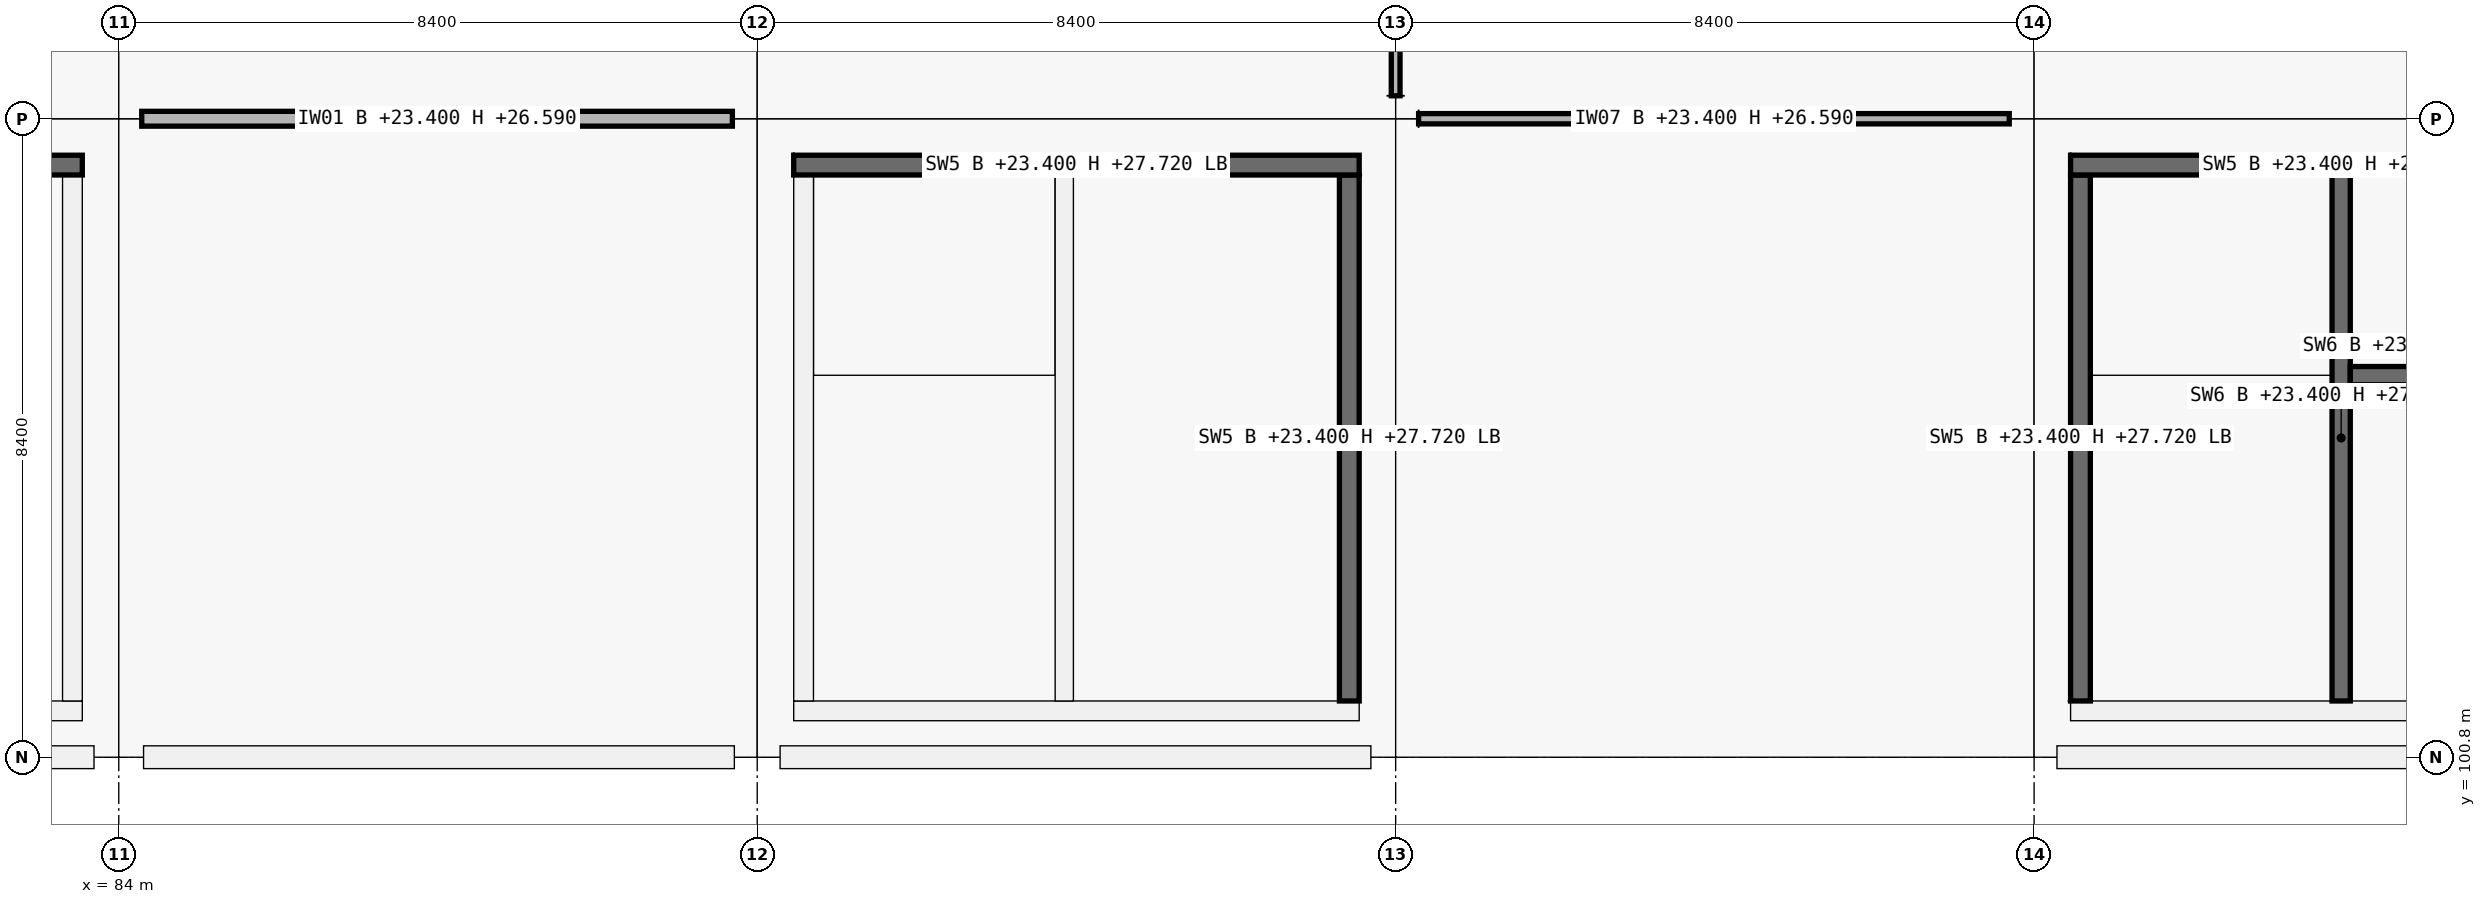
"""IFC4 building model, lengths in metres.
Left out: names, types, materials, properties, quantities, classifications, styles, units other than length and angle.
Written with IfcOpenShell. Run it as: python <this file> out.ifc"""

import sys

from ifc_helpers import new_model, si_unit, direction, frame, frame_2d, origin, origin_2d, place, context, subcontext, project, spatial, rectangle, extrude, element, fill, save


model = new_model("IFC4")
c1 = context("Model", 3, precision=1e-05, world=origin(), true_north=direction((0.0, 1.0)))
c2 = subcontext(c1, "Body", "Model", "MODEL_VIEW")
j1 = project(units=[si_unit("LENGTHUNIT", "METRE"), si_unit("PLANEANGLEUNIT", "RADIAN")], contexts=[c1])
p1 = place(None, origin())
s1 = spatial("IfcSite", under=j1, at=p1, CompositionType="ELEMENT")
p2 = place(p1, origin())
s2 = spatial("IfcBuilding", under=s1, at=p2, CompositionType="ELEMENT")
p3 = place(p2, frame((0.0, 0.0, 23.4)))
s3 = spatial("IfcBuildingStorey", under=s2, at=p3, CompositionType="ELEMENT", Elevation=23.4)
p4 = place(p3, frame((84.0, 100.8, 0.0), z_axis=(0.0, 0.0, 1.0), x_axis=(1.0, 0.0, 0.0)))
e1 = element("IfcColumn", 1, at=p4, inside=s3, PredefinedType="COLUMN", context=c2, shape_type="SweptSolid", body=[
    extrude(rectangle(XDim=0.65, YDim=0.65, at=origin_2d()), origin(), (0.0, 0.0, 1.0), 4.32),
])
for number, where, z_axis, x_axis in (
    (2, (84.0, 109.2, 0.0), (0.0, 0.0, 1.0), (1.0, 0.0, 0.0)),
    (3, (92.4, 100.8, 0.0), (0.0, 0.0, 1.0), (1.0, 0.0, 0.0)),
):
    element("IfcColumn", number, at=place(p3, frame(where, z_axis=z_axis, x_axis=x_axis)), inside=s3, PredefinedType="COLUMN", context=c2, shape_type="SweptSolid", body=[
        extrude(rectangle(XDim=0.6, YDim=0.6, at=origin_2d()), origin(), (0.0, 0.0, 1.0), 4.32),
    ])
for number, where, z_axis, x_axis in (
    (4, (92.4, 109.2, 0.0), (0.0, 0.0, 1.0), (1.0, 0.0, 0.0)),
    (5, (100.8, 100.8, 0.0), (0.0, 0.0, 1.0), (1.0, 0.0, 0.0)),
):
    element("IfcColumn", number, at=place(p3, frame(where, z_axis=z_axis, x_axis=x_axis)), inside=s3, PredefinedType="COLUMN", context=c2, shape_type="SweptSolid", body=[
        extrude(rectangle(XDim=0.65, YDim=0.65, at=origin_2d()), origin(), (0.0, 0.0, 1.0), 4.32),
    ])
for number, where, z_axis, x_axis in (
    (6, (100.8, 109.2, 0.0), (0.0, 0.0, 1.0), (1.0, 0.0, 0.0)),
    (7, (109.2, 100.8, 0.0), (0.0, 0.0, 1.0), (1.0, 0.0, 0.0)),
):
    element("IfcColumn", number, at=place(p3, frame(where, z_axis=z_axis, x_axis=x_axis)), inside=s3, PredefinedType="COLUMN", context=c2, shape_type="SweptSolid", body=[
        extrude(rectangle(XDim=0.6, YDim=0.6, at=origin_2d()), origin(), (0.0, 0.0, 1.0), 4.32),
    ])
p5 = place(p3, frame((109.2, 109.2, 0.0), z_axis=(0.0, 0.0, 1.0), x_axis=(1.0, 0.0, 0.0)))
e8 = element("IfcColumn", 8, at=p5, inside=s3, PredefinedType="COLUMN", context=c2, shape_type="SweptSolid", body=[
    extrude(rectangle(XDim=0.65, YDim=0.65, at=origin_2d()), origin(), (0.0, 0.0, 1.0), 4.32),
])
p6 = place(p3, frame((83.674, 100.8, 0.0), z_axis=(0.0, 0.0, 1.0), x_axis=(-1.0, 0.0, 0.0)))
e9 = element("IfcWall", 9, at=p6, inside=s3, PredefinedType="SOLIDWALL", context=c2, shape_type="SweptSolid", body=[
    extrude(rectangle(XDim=7.773, YDim=0.3, at=frame_2d((3.887, 0.0))), origin(), (0.0, 0.0, 1.0), 3.37),
])
p7 = place(p3, frame((92.099, 100.8, 0.0), z_axis=(0.0, 0.0, 1.0), x_axis=(-1.0, 0.0, 0.0)))
e10 = element("IfcWall", 10, at=p7, inside=s3, PredefinedType="SOLIDWALL", context=c2, shape_type="SweptSolid", body=[
    extrude(rectangle(XDim=7.773, YDim=0.3, at=frame_2d((3.887, 0.0))), origin(), (0.0, 0.0, 1.0), 3.37),
])
p8 = place(p7, frame((2.861, 0.0, 0.9)))
e11 = element("IfcOpeningElement", 11, at=p8, cuts=e10, PredefinedType="OPENING", context=c2, shape_type="SweptSolid", body=[
    extrude(rectangle(XDim=2.05, YDim=1.45, at=frame_2d((1.025, 0.725))), frame((0.0, 0.15, 0.0), z_axis=(0.0, -1.0, 0.0), x_axis=(1.0, 0.0, 0.0)), (0.0, 0.0, 1.0), 0.3),
])
p9 = place(p3, frame((100.474, 100.8, 0.0), z_axis=(0.0, 0.0, 1.0), x_axis=(-1.0, 0.0, 0.0)))
e12 = element("IfcWall", 12, at=p9, inside=s3, PredefinedType="SOLIDWALL", context=c2, shape_type="SweptSolid", body=[
    extrude(rectangle(XDim=7.773, YDim=0.3, at=frame_2d((3.887, 0.0))), origin(), (0.0, 0.0, 1.0), 3.37),
])
p10 = place(p3, frame((117.274, 100.8, 0.0), z_axis=(0.0, 0.0, 1.0), x_axis=(-1.0, 0.0, 0.0)))
e13 = element("IfcWall", 13, at=p10, inside=s3, PredefinedType="SOLIDWALL", context=c2, shape_type="SweptSolid", body=[
    extrude(rectangle(XDim=7.773, YDim=0.3, at=frame_2d((3.886, 0.0))), origin(), (0.0, 0.0, 1.0), 3.37),
])
p11 = place(p3, frame((117.12, 101.41, 0.0), z_axis=(0.0, 0.0, 1.0), x_axis=(-1.0, 0.0, 0.0)))
e14 = element("IfcWall", 14, at=p11, inside=s3, PredefinedType="SHEAR", context=c2, shape_type="SweptSolid", body=[
    extrude(rectangle(XDim=7.44, YDim=0.26, at=frame_2d((3.72, 0.0))), origin(), (0.0, 0.0, 1.0), 4.32),
])
p12 = place(p3, frame((109.81, 101.54, 0.0), z_axis=(0.0, 0.0, 1.0), x_axis=(0.0, 1.0, 0.0)))
e15 = element("IfcWall", 15, at=p12, inside=s3, PredefinedType="SHEAR", context=c2, shape_type="SweptSolid", body=[
    extrude(rectangle(XDim=6.92, YDim=0.26, at=frame_2d((3.46, 0.0))), origin(), (0.0, 0.0, 1.0), 4.32),
])
p13 = place(p3, frame((109.68, 108.59, 0.0), z_axis=(0.0, 0.0, 1.0), x_axis=(1.0, 0.0, 0.0)))
e16 = element("IfcWall", 16, at=p13, inside=s3, PredefinedType="SHEAR", context=c2, shape_type="SweptSolid", body=[
    extrude(rectangle(XDim=7.44, YDim=0.26, at=frame_2d((3.72, 0.0))), origin(), (0.0, 0.0, 1.0), 4.32),
])
p14 = place(p3, frame((113.24, 101.54, 0.0), z_axis=(0.0, 0.0, 1.0), x_axis=(0.0, 1.0, 0.0)))
e17 = element("IfcWall", 17, at=p14, inside=s3, PredefinedType="SHEAR", context=c2, shape_type="SweptSolid", body=[
    extrude(rectangle(XDim=6.92, YDim=0.24, at=frame_2d((3.46, 0.0))), origin(), (0.0, 0.0, 1.0), 4.32),
])
p15 = place(p14, frame((0.12, 0.0, 0.0)))
e18 = element("IfcOpeningElement", 18, at=p15, cuts=e17, PredefinedType="OPENING", context=c2, shape_type="SweptSolid", body=[
    extrude(rectangle(XDim=1.0, YDim=2.15, at=frame_2d((0.5, 1.075))), frame((0.0, 0.12, 0.0), z_axis=(0.0, -1.0, 0.0), x_axis=(1.0, 0.0, 0.0)), (0.0, 0.0, 1.0), 0.24),
])
p16 = place(p3, frame((113.36, 105.82, 0.0), z_axis=(0.0, 0.0, 1.0), x_axis=(1.0, 0.0, 0.0)))
e19 = element("IfcWall", 19, at=p16, inside=s3, PredefinedType="SHEAR", context=c2, shape_type="SweptSolid", body=[
    extrude(rectangle(XDim=3.5, YDim=0.24, at=frame_2d((1.75, 0.0))), origin(), (0.0, 0.0, 1.0), 4.32),
])
p17 = place(p16, frame((1.15, 0.0, 0.0)))
e20 = element("IfcOpeningElement", 20, at=p17, cuts=e19, PredefinedType="OPENING", context=c2, shape_type="SweptSolid", body=[
    extrude(rectangle(XDim=1.2, YDim=2.2, at=frame_2d((0.6, 1.1))), frame((0.0, 0.12, 0.0), z_axis=(0.0, -1.0, 0.0), x_axis=(1.0, 0.0, 0.0)), (0.0, 0.0, 1.0), 0.24),
])
for number, where, z_axis, x_axis in (
    (21, (83.52, 101.41, 0.0), (0.0, 0.0, 1.0), (-1.0, 0.0, 0.0)),
    (22, (76.08, 108.59, 0.0), (0.0, 0.0, 1.0), (1.0, 0.0, 0.0)),
):
    element("IfcWall", number, at=place(p3, frame(where, z_axis=z_axis, x_axis=x_axis)), inside=s3, PredefinedType="SHEAR", context=c2, shape_type="SweptSolid", body=[
        extrude(rectangle(XDim=7.44, YDim=0.26, at=frame_2d((3.72, 0.0))), origin(), (0.0, 0.0, 1.0), 4.32),
    ])
p18 = place(p3, frame((83.39, 108.46, 0.0), z_axis=(0.0, 0.0, 1.0), x_axis=(0.0, -1.0, 0.0)))
e23 = element("IfcWall", 23, at=p18, inside=s3, PredefinedType="SHEAR", context=c2, shape_type="SweptSolid", body=[
    extrude(rectangle(XDim=6.92, YDim=0.26, at=frame_2d((3.46, 0.0))), origin(), (0.0, 0.0, 1.0), 4.32),
])
p19 = place(p18, frame((4.01, 0.0, 0.0)))
e24 = element("IfcOpeningElement", 24, at=p19, cuts=e23, PredefinedType="OPENING", context=c2, shape_type="SweptSolid", body=[
    extrude(rectangle(XDim=1.5, YDim=2.15, at=frame_2d((0.75, 1.075))), frame((0.0, 0.13, 0.0), z_axis=(0.0, -1.0, 0.0), x_axis=(1.0, 0.0, 0.0)), (0.0, 0.0, 1.0), 0.26),
])
p20 = place(p3, frame((100.32, 101.41, 0.0), z_axis=(0.0, 0.0, 1.0), x_axis=(-1.0, 0.0, 0.0)))
e25 = element("IfcWall", 25, at=p20, inside=s3, PredefinedType="SHEAR", context=c2, shape_type="SweptSolid", body=[
    extrude(rectangle(XDim=7.44, YDim=0.26, at=frame_2d((3.72, 0.0))), origin(), (0.0, 0.0, 1.0), 4.32),
])
p21 = place(p3, frame((93.01, 101.54, 0.0), z_axis=(0.0, 0.0, 1.0), x_axis=(0.0, 1.0, 0.0)))
e26 = element("IfcWall", 26, at=p21, inside=s3, PredefinedType="SHEAR", context=c2, shape_type="SweptSolid", body=[
    extrude(rectangle(XDim=6.92, YDim=0.26, at=frame_2d((3.46, 0.0))), origin(), (0.0, 0.0, 1.0), 4.32),
])
p22 = place(p3, frame((92.88, 108.59, 0.0), z_axis=(0.0, 0.0, 1.0), x_axis=(1.0, 0.0, 0.0)))
e27 = element("IfcWall", 27, at=p22, inside=s3, PredefinedType="SHEAR", context=c2, shape_type="SweptSolid", body=[
    extrude(rectangle(XDim=7.44, YDim=0.26, at=frame_2d((3.72, 0.0))), origin(), (0.0, 0.0, 1.0), 4.32),
])
p23 = place(p3, frame((100.19, 108.46, 0.0), z_axis=(0.0, 0.0, 1.0), x_axis=(0.0, -1.0, 0.0)))
e28 = element("IfcWall", 28, at=p23, inside=s3, PredefinedType="SHEAR", context=c2, shape_type="SweptSolid", body=[
    extrude(rectangle(XDim=6.92, YDim=0.26, at=frame_2d((3.46, 0.0))), origin(), (0.0, 0.0, 1.0), 4.32),
])
p24 = place(p23, frame((4.01, 0.0, 0.0)))
e29 = element("IfcOpeningElement", 29, at=p24, cuts=e28, PredefinedType="OPENING", context=c2, shape_type="SweptSolid", body=[
    extrude(rectangle(XDim=1.5, YDim=2.15, at=frame_2d((0.75, 1.075))), frame((0.0, 0.13, 0.0), z_axis=(0.0, -1.0, 0.0), x_axis=(1.0, 0.0, 0.0)), (0.0, 0.0, 1.0), 0.26),
])
p25 = place(p3, frame((96.44, 101.54, 0.0), z_axis=(0.0, 0.0, 1.0), x_axis=(0.0, 1.0, 0.0)))
e30 = element("IfcWall", 30, at=p25, inside=s3, PredefinedType="SHEAR", context=c2, shape_type="SweptSolid", body=[
    extrude(rectangle(XDim=6.92, YDim=0.24, at=frame_2d((3.46, 0.0))), origin(), (0.0, 0.0, 1.0), 4.32),
])
p26 = place(p25, frame((0.12, 0.0, 0.0)))
e31 = element("IfcOpeningElement", 31, at=p26, cuts=e30, PredefinedType="OPENING", context=c2, shape_type="SweptSolid", body=[
    extrude(rectangle(XDim=1.0, YDim=2.15, at=frame_2d((0.5, 1.075))), frame((0.0, 0.12, 0.0), z_axis=(0.0, -1.0, 0.0), x_axis=(1.0, 0.0, 0.0)), (0.0, 0.0, 1.0), 0.24),
])
p27 = place(p3, frame((84.302, 109.2, 0.0), z_axis=(0.0, 0.0, 1.0), x_axis=(1.0, 0.0, 0.0)))
e32 = element("IfcWall", 32, at=p27, inside=s3, PredefinedType="PARTITIONING", context=c2, shape_type="SweptSolid", body=[
    extrude(rectangle(XDim=7.771, YDim=0.195, at=frame_2d((3.885, 0.0))), origin(), (0.0, 0.0, 1.0), 3.19),
])
p28 = place(p27, frame((3.375, 0.0, 0.0)))
e33 = element("IfcOpeningElement", 33, at=p28, cuts=e32, PredefinedType="OPENING", context=c2, shape_type="SweptSolid", body=[
    extrude(rectangle(XDim=1.02, YDim=2.2, at=frame_2d((0.51, 1.1))), frame((0.0, 0.098, 0.0), z_axis=(0.0, -1.0, 0.0), x_axis=(1.0, 0.0, 0.0)), (0.0, 0.0, 1.0), 0.195),
])
p29 = place(p3, frame((101.102, 109.2, 0.0), z_axis=(0.0, 0.0, 1.0), x_axis=(1.0, 0.0, 0.0)))
e34 = element("IfcWall", 34, at=p29, inside=s3, PredefinedType="PARTITIONING", context=c2, shape_type="SweptSolid", body=[
    extrude(rectangle(XDim=7.771, YDim=0.135, at=frame_2d((3.885, 0.0))), origin(), (0.0, 0.0, 1.0), 3.19),
])
p30 = place(p29, frame((3.035, 0.0, 0.0)))
e35 = element("IfcOpeningElement", 35, at=p30, cuts=e34, PredefinedType="OPENING", context=c2, shape_type="SweptSolid", body=[
    extrude(rectangle(XDim=1.7, YDim=2.35, at=frame_2d((0.85, 1.175))), frame((0.0, 0.067, 0.0), z_axis=(0.0, -1.0, 0.0), x_axis=(1.0, 0.0, 0.0)), (0.0, 0.0, 1.0), 0.135),
])
p31 = place(p3, frame((100.8, 109.502, 0.0), z_axis=(0.0, 0.0, 1.0), x_axis=(0.0, 1.0, 0.0)))
e36 = element("IfcWall", 36, at=p31, inside=s3, PredefinedType="PARTITIONING", context=c2, shape_type="SweptSolid", body=[
    extrude(rectangle(XDim=7.821, YDim=0.115, at=frame_2d((3.911, 0.0))), origin(), (0.0, 0.0, 1.0), 3.19),
])
p32 = place(p31, frame((3.21, 0.0, 0.0)))
e37 = element("IfcOpeningElement", 37, at=p32, cuts=e36, PredefinedType="OPENING", context=c2, shape_type="SweptSolid", body=[
    extrude(rectangle(XDim=1.4, YDim=2.25, at=frame_2d((0.7, 1.125))), frame((0.0, 0.058, 0.0), z_axis=(0.0, -1.0, 0.0), x_axis=(1.0, 0.0, 0.0)), (0.0, 0.0, 1.0), 0.115),
])
p33 = place(p8, origin())
e38 = element("IfcWindow", 38, at=p33, inside=s3, PartitioningType="SINGLE_PANEL", PredefinedType="WINDOW", context=c2, shape_type="SweptSolid", body=[
    extrude(rectangle(XDim=2.05, YDim=1.45, at=frame_2d((1.025, 0.725))), frame((0.0, 0.03, 0.0), z_axis=(0.0, -1.0, 0.0), x_axis=(1.0, 0.0, 0.0)), (0.0, 0.0, 1.0), 0.06),
])
fill(e11, e38)
p34 = place(p15, origin())
e39 = element("IfcDoor", 39, at=p34, inside=s3, OperationType="SINGLE_SWING_LEFT", PredefinedType="DOOR", context=c2, shape_type="SweptSolid", body=[
    extrude(rectangle(XDim=1.0, YDim=2.15, at=frame_2d((0.5, 1.075))), frame((0.0, 0.025, 0.0), z_axis=(0.0, -1.0, 0.0), x_axis=(1.0, 0.0, 0.0)), (0.0, 0.0, 1.0), 0.05),
])
fill(e18, e39)
p35 = place(p19, origin())
e40 = element("IfcDoor", 40, at=p35, inside=s3, OperationType="DOUBLE_DOOR_SINGLE_SWING", PredefinedType="DOOR", context=c2, shape_type="SweptSolid", body=[
    extrude(rectangle(XDim=1.5, YDim=2.15, at=frame_2d((0.75, 1.075))), frame((0.0, 0.025, 0.0), z_axis=(0.0, -1.0, 0.0), x_axis=(1.0, 0.0, 0.0)), (0.0, 0.0, 1.0), 0.05),
])
fill(e24, e40)
p36 = place(p26, origin())
e41 = element("IfcDoor", 41, at=p36, inside=s3, OperationType="SINGLE_SWING_LEFT", PredefinedType="DOOR", context=c2, shape_type="SweptSolid", body=[
    extrude(rectangle(XDim=1.0, YDim=2.15, at=frame_2d((0.5, 1.075))), frame((0.0, 0.025, 0.0), z_axis=(0.0, -1.0, 0.0), x_axis=(1.0, 0.0, 0.0)), (0.0, 0.0, 1.0), 0.05),
])
fill(e31, e41)
p37 = place(p24, origin())
e42 = element("IfcDoor", 42, at=p37, inside=s3, OperationType="DOUBLE_DOOR_SINGLE_SWING", PredefinedType="DOOR", context=c2, shape_type="SweptSolid", body=[
    extrude(rectangle(XDim=1.5, YDim=2.15, at=frame_2d((0.75, 1.075))), frame((0.0, 0.025, 0.0), z_axis=(0.0, -1.0, 0.0), x_axis=(1.0, 0.0, 0.0)), (0.0, 0.0, 1.0), 0.05),
])
fill(e29, e42)
p38 = place(p28, origin())
e43 = element("IfcDoor", 43, at=p38, inside=s3, OperationType="SINGLE_SWING_LEFT", PredefinedType="DOOR", context=c2, shape_type="SweptSolid", body=[
    extrude(rectangle(XDim=1.02, YDim=2.2, at=frame_2d((0.51, 1.1))), frame((0.0, 0.025, 0.0), z_axis=(0.0, -1.0, 0.0), x_axis=(1.0, 0.0, 0.0)), (0.0, 0.0, 1.0), 0.05),
])
fill(e33, e43)
p39 = place(p30, origin())
e44 = element("IfcDoor", 44, at=p39, inside=s3, OperationType="DOUBLE_DOOR_SINGLE_SWING", PredefinedType="DOOR", context=c2, shape_type="SweptSolid", body=[
    extrude(rectangle(XDim=1.7, YDim=2.35, at=frame_2d((0.85, 1.175))), frame((0.0, 0.025, 0.0), z_axis=(0.0, -1.0, 0.0), x_axis=(1.0, 0.0, 0.0)), (0.0, 0.0, 1.0), 0.05),
])
fill(e35, e44)
save(model, sys.argv[1])
